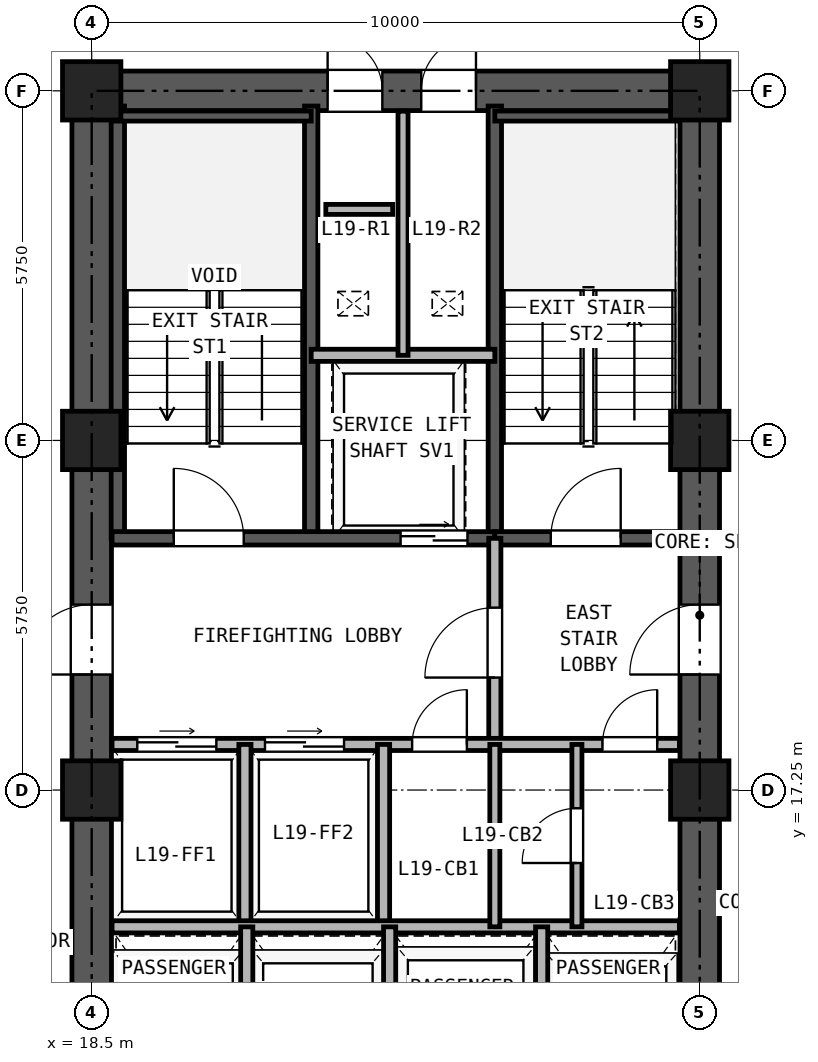
"""IFC4 building model, lengths in metres.
Left out: names, types, materials, properties, quantities, classifications, styles, units other than length and angle.
Written with IfcOpenShell. Run it as: python <this file> out.ifc"""

import sys

from ifc_helpers import new_model, si_unit, direction, frame, frame_2d, origin, origin_2d, place, context, subcontext, project, spatial, rectangle, hollow_rectangle, extrude, source, transform, mapped, element, fill, save


model = new_model("IFC4")
c1 = context("Model", 3, precision=1e-05, world=origin(), true_north=direction((0.0, 1.0)))
c2 = subcontext(c1, "Body", "Model", "MODEL_VIEW")
j1 = project(units=[si_unit("LENGTHUNIT", "METRE"), si_unit("PLANEANGLEUNIT", "RADIAN")], contexts=[c1])
p1 = place(None, origin())
s1 = spatial("IfcSite", under=j1, at=p1, CompositionType="ELEMENT")
p2 = place(p1, origin())
s2 = spatial("IfcBuilding", under=s1, at=p2, CompositionType="ELEMENT")
p3 = place(p2, frame((0.0, 0.0, 72.9)))
s3 = spatial("IfcBuildingStorey", under=s2, at=p3, CompositionType="ELEMENT", Elevation=72.9)
m1 = source(origin(), c2, "Body", "SweptSolid", [
    extrude(hollow_rectangle(XDim=0.96, YDim=0.96, WallThickness=0.06, at=origin_2d()), origin(), (0.0, 0.0, 1.0), 3.24),
])
for number, where, z_axis, x_axis in (
    (1, (18.5, 17.25, 0.0), (0.0, 0.0, 1.0), (1.0, 0.0, 0.0)),
    (2, (18.5, 23.0, 0.0), (0.0, 0.0, 1.0), (1.0, 0.0, 0.0)),
    (3, (18.5, 28.75, 0.0), (0.0, 0.0, 1.0), (1.0, 0.0, 0.0)),
    (4, (28.5, 17.25, 0.0), (0.0, 0.0, 1.0), (1.0, 0.0, 0.0)),
    (5, (28.5, 23.0, 0.0), (0.0, 0.0, 1.0), (1.0, 0.0, 0.0)),
    (6, (28.5, 28.75, 0.0), (0.0, 0.0, 1.0), (1.0, 0.0, 0.0)),
):
    element("IfcColumn", number, at=place(p3, frame(where, z_axis=z_axis, x_axis=x_axis)), inside=s3, PredefinedType="COLUMN", context=c2, shape_type="MappedRepresentation", body=[
        mapped(m1, transform((0.0, 0.0, 0.0), x_axis=(1.0, 0.0, 0.0), y_axis=(0.0, 1.0, 0.0), z_axis=(0.0, 0.0, 1.0), scale=1.0)),
    ])
p4 = place(p3, frame((18.175, 28.75, 0.0), z_axis=(0.0, 0.0, 1.0), x_axis=(1.0, 0.0, 0.0)))
e7 = element("IfcWall", 7, at=p4, inside=s3, PredefinedType="SHEAR", context=c2, shape_type="SweptSolid", body=[
    extrude(rectangle(XDim=10.65, YDim=0.65, at=frame_2d((5.325, 0.0))), origin(), (0.0, 0.0, 1.0), 3.24),
])
p5 = place(p4, frame((4.205, 0.0, 0.0)))
e8 = element("IfcOpeningElement", 8, at=p5, cuts=e7, PredefinedType="OPENING", context=c2, shape_type="SweptSolid", body=[
    extrude(rectangle(XDim=0.9, YDim=2.05, at=frame_2d((0.45, 1.025))), frame((0.0, 0.335, 0.0), z_axis=(0.0, -1.0, 0.0), x_axis=(1.0, 0.0, 0.0)), (0.0, 0.0, 1.0), 0.67),
])
p6 = place(p4, frame((5.745, 0.0, 0.0)))
e9 = element("IfcOpeningElement", 9, at=p6, cuts=e7, PredefinedType="OPENING", context=c2, shape_type="SweptSolid", body=[
    extrude(rectangle(XDim=0.9, YDim=2.05, at=frame_2d((0.45, 1.025))), frame((0.0, 0.335, 0.0), z_axis=(0.0, -1.0, 0.0), x_axis=(1.0, 0.0, 0.0)), (0.0, 0.0, 1.0), 0.67),
])
p7 = place(p3, frame((18.5, 11.825, 0.0), z_axis=(0.0, 0.0, 1.0), x_axis=(0.0, 1.0, 0.0)))
e10 = element("IfcWall", 10, at=p7, inside=s3, PredefinedType="SHEAR", context=c2, shape_type="SweptSolid", body=[
    extrude(rectangle(XDim=16.6, YDim=0.65, at=frame_2d((8.3, 0.0))), origin(), (0.0, 0.0, 1.0), 3.24),
])
p8 = place(p7, frame((7.325, 0.0, 0.0)))
e11 = element("IfcOpeningElement", 11, at=p8, cuts=e10, PredefinedType="OPENING", context=c2, shape_type="SweptSolid", body=[
    extrude(rectangle(XDim=1.15, YDim=2.2, at=frame_2d((0.575, 1.1))), frame((0.0, 0.335, 0.0), z_axis=(0.0, -1.0, 0.0), x_axis=(1.0, 0.0, 0.0)), (0.0, 0.0, 1.0), 0.67),
])
p9 = place(p3, frame((28.5, 11.825, 0.0), z_axis=(0.0, 0.0, 1.0), x_axis=(0.0, 1.0, 0.0)))
e12 = element("IfcWall", 12, at=p9, inside=s3, PredefinedType="SHEAR", context=c2, shape_type="SweptSolid", body=[
    extrude(rectangle(XDim=16.6, YDim=0.65, at=frame_2d((8.3, 0.0))), origin(), (0.0, 0.0, 1.0), 3.24),
])
p10 = place(p9, frame((7.325, 0.0, 0.0)))
e13 = element("IfcOpeningElement", 13, at=p10, cuts=e12, PredefinedType="OPENING", context=c2, shape_type="SweptSolid", body=[
    extrude(rectangle(XDim=1.15, YDim=2.2, at=frame_2d((0.575, 1.1))), frame((0.0, 0.335, 0.0), z_axis=(0.0, -1.0, 0.0), x_axis=(1.0, 0.0, 0.0)), (0.0, 0.0, 1.0), 0.67),
])
for number, where, z_axis, x_axis in (
    (14, (18.93, 21.39, 0.0), (0.0, 0.0, 1.0), (0.0, 1.0, 0.0)),
    (15, (22.11, 21.39, 0.0), (0.0, 0.0, 1.0), (0.0, 1.0, 0.0)),
    (16, (25.13, 21.39, 0.0), (0.0, 0.0, 1.0), (0.0, 1.0, 0.0)),
):
    element("IfcWall", number, at=place(p3, frame(where, z_axis=z_axis, x_axis=x_axis)), inside=s3, PredefinedType="SOLIDWALL", context=c2, shape_type="SweptSolid", body=[
        extrude(rectangle(XDim=7.11, YDim=0.22, at=frame_2d((3.555, 0.0))), origin(), (0.0, 0.0, 1.0), 3.24),
    ])
p11 = place(p3, frame((18.835, 28.335, 0.0), z_axis=(0.0, 0.0, 1.0), x_axis=(1.0, 0.0, 0.0)))
e17 = element("IfcWall", 17, at=p11, inside=s3, PredefinedType="PARTITIONING", context=c2, shape_type="SweptSolid", body=[
    extrude(rectangle(XDim=3.275, YDim=0.165, at=frame_2d((1.638, 0.0))), origin(), (0.0, 0.0, 1.0), 3.24),
])
p12 = place(p3, frame((25.13, 28.335, 0.0), z_axis=(0.0, 0.0, 1.0), x_axis=(1.0, 0.0, 0.0)))
e18 = element("IfcWall", 18, at=p12, inside=s3, PredefinedType="PARTITIONING", context=c2, shape_type="SweptSolid", body=[
    extrude(rectangle(XDim=3.035, YDim=0.165, at=frame_2d((1.518, 0.0))), origin(), (0.0, 0.0, 1.0), 3.24),
])
p13 = place(p3, frame((18.835, 21.39, 0.0), z_axis=(0.0, 0.0, 1.0), x_axis=(1.0, 0.0, 0.0)))
e19 = element("IfcWall", 19, at=p13, inside=s3, PredefinedType="SOLIDWALL", context=c2, shape_type="SweptSolid", body=[
    extrude(rectangle(XDim=6.295, YDim=0.22, at=frame_2d((3.147, 0.0))), origin(), (0.0, 0.0, 1.0), 3.24),
])
p14 = place(p13, frame((1.015, 0.0, 0.0)))
e20 = element("IfcOpeningElement", 20, at=p14, cuts=e19, PredefinedType="OPENING", context=c2, shape_type="SweptSolid", body=[
    extrude(rectangle(XDim=1.15, YDim=2.2, at=frame_2d((0.575, 1.1))), frame((0.0, 0.12, 0.0), z_axis=(0.0, -1.0, 0.0), x_axis=(1.0, 0.0, 0.0)), (0.0, 0.0, 1.0), 0.24),
])
p15 = place(p13, frame((4.745, 0.0, 0.0)))
e21 = element("IfcOpeningElement", 21, at=p15, cuts=e19, PredefinedType="OPENING", context=c2, shape_type="SweptSolid", body=[
    extrude(rectangle(XDim=1.1, YDim=2.25, at=frame_2d((0.55, 1.125))), frame((0.0, 0.12, 0.0), z_axis=(0.0, -1.0, 0.0), x_axis=(1.0, 0.0, 0.0)), (0.0, 0.0, 1.0), 0.24),
])
p16 = place(p3, frame((25.13, 21.39, 0.0), z_axis=(0.0, 0.0, 1.0), x_axis=(1.0, 0.0, 0.0)))
e22 = element("IfcWall", 22, at=p16, inside=s3, PredefinedType="SOLIDWALL", context=c2, shape_type="SweptSolid", body=[
    extrude(rectangle(XDim=3.035, YDim=0.22, at=frame_2d((1.518, 0.0))), origin(), (0.0, 0.0, 1.0), 3.24),
])
p17 = place(p16, frame((0.92, 0.0, 0.0)))
e23 = element("IfcOpeningElement", 23, at=p17, cuts=e22, PredefinedType="OPENING", context=c2, shape_type="SweptSolid", body=[
    extrude(rectangle(XDim=1.15, YDim=2.2, at=frame_2d((0.575, 1.1))), frame((0.0, 0.12, 0.0), z_axis=(0.0, -1.0, 0.0), x_axis=(1.0, 0.0, 0.0)), (0.0, 0.0, 1.0), 0.24),
])
p18 = place(p3, frame((22.11, 24.4, 0.0), z_axis=(0.0, 0.0, 1.0), x_axis=(1.0, 0.0, 0.0)))
e24 = element("IfcWall", 24, at=p18, inside=s3, PredefinedType="PARTITIONING", context=c2, shape_type="SweptSolid", body=[
    extrude(rectangle(XDim=3.02, YDim=0.2, at=frame_2d((1.51, 0.0))), origin(), (0.0, 0.0, 1.0), 3.24),
])
p19 = place(p3, frame((23.62, 24.4, 0.0), z_axis=(0.0, 0.0, 1.0), x_axis=(0.0, 1.0, 0.0)))
e25 = element("IfcWall", 25, at=p19, inside=s3, PredefinedType="PARTITIONING", context=c2, shape_type="SweptSolid", body=[
    extrude(rectangle(XDim=4.015, YDim=0.165, at=frame_2d((2.008, 0.0))), origin(), (0.0, 0.0, 1.0), 3.24),
])
p20 = place(p3, frame((25.13, 18.0, 0.0), z_axis=(0.0, 0.0, 1.0), x_axis=(0.0, 1.0, 0.0)))
e26 = element("IfcWall", 26, at=p20, inside=s3, PredefinedType="PARTITIONING", context=c2, shape_type="SweptSolid", body=[
    extrude(rectangle(XDim=3.39, YDim=0.2, at=frame_2d((1.695, 0.0))), origin(), (0.0, 0.0, 1.0), 3.24),
])
p21 = place(p20, frame((1.1, 0.0, 0.0)))
e27 = element("IfcOpeningElement", 27, at=p21, cuts=e26, PredefinedType="OPENING", context=c2, shape_type="SweptSolid", body=[
    extrude(rectangle(XDim=1.15, YDim=2.2, at=frame_2d((0.575, 1.1))), frame((0.0, 0.11, 0.0), z_axis=(0.0, -1.0, 0.0), x_axis=(1.0, 0.0, 0.0)), (0.0, 0.0, 1.0), 0.22),
])
p22 = place(p3, frame((18.835, 18.0, 0.0), z_axis=(0.0, 0.0, 1.0), x_axis=(1.0, 0.0, 0.0)))
e28 = element("IfcWall", 28, at=p22, inside=s3, PredefinedType="PARTITIONING", context=c2, shape_type="SweptSolid", body=[
    extrude(rectangle(XDim=9.33, YDim=0.2, at=frame_2d((4.665, 0.0))), origin(), (0.0, 0.0, 1.0), 3.24),
])
p23 = place(p22, frame((0.415, 0.0, 0.0)))
e29 = element("IfcOpeningElement", 29, at=p23, cuts=e28, PredefinedType="OPENING", context=c2, shape_type="SweptSolid", body=[
    extrude(rectangle(XDim=1.3, YDim=2.3, at=frame_2d((0.65, 1.15))), frame((0.0, 0.11, 0.0), z_axis=(0.0, -1.0, 0.0), x_axis=(1.0, 0.0, 0.0)), (0.0, 0.0, 1.0), 0.22),
])
p24 = place(p22, frame((2.515, 0.0, 0.0)))
e30 = element("IfcOpeningElement", 30, at=p24, cuts=e28, PredefinedType="OPENING", context=c2, shape_type="SweptSolid", body=[
    extrude(rectangle(XDim=1.3, YDim=2.3, at=frame_2d((0.65, 1.15))), frame((0.0, 0.11, 0.0), z_axis=(0.0, -1.0, 0.0), x_axis=(1.0, 0.0, 0.0)), (0.0, 0.0, 1.0), 0.22),
])
p25 = place(p22, frame((4.935, 0.0, 0.0)))
e31 = element("IfcOpeningElement", 31, at=p25, cuts=e28, PredefinedType="OPENING", context=c2, shape_type="SweptSolid", body=[
    extrude(rectangle(XDim=0.9, YDim=2.05, at=frame_2d((0.45, 1.025))), frame((0.0, 0.11, 0.0), z_axis=(0.0, -1.0, 0.0), x_axis=(1.0, 0.0, 0.0)), (0.0, 0.0, 1.0), 0.22),
])
p26 = place(p22, frame((8.065, 0.0, 0.0)))
e32 = element("IfcOpeningElement", 32, at=p26, cuts=e28, PredefinedType="OPENING", context=c2, shape_type="SweptSolid", body=[
    extrude(rectangle(XDim=0.9, YDim=2.05, at=frame_2d((0.45, 1.025))), frame((0.0, 0.11, 0.0), z_axis=(0.0, -1.0, 0.0), x_axis=(1.0, 0.0, 0.0)), (0.0, 0.0, 1.0), 0.22),
])
for number, where, z_axis, x_axis in (
    (33, (21.02, 15.0, 0.0), (0.0, 0.0, 1.0), (0.0, 1.0, 0.0)),
    (34, (23.3, 15.0, 0.0), (0.0, 0.0, 1.0), (0.0, 1.0, 0.0)),
):
    element("IfcWall", number, at=place(p3, frame(where, z_axis=z_axis, x_axis=x_axis)), inside=s3, PredefinedType="PARTITIONING", context=c2, shape_type="SweptSolid", body=[
        extrude(rectangle(XDim=3.0, YDim=0.2, at=frame_2d((1.5, 0.0))), origin(), (0.0, 0.0, 1.0), 3.24),
    ])
p27 = place(p3, frame((18.835, 15.0, 0.0), z_axis=(0.0, 0.0, 1.0), x_axis=(1.0, 0.0, 0.0)))
e35 = element("IfcWall", 35, at=p27, inside=s3, PredefinedType="PARTITIONING", context=c2, shape_type="SweptSolid", body=[
    extrude(rectangle(XDim=9.33, YDim=0.2, at=frame_2d((4.665, 0.0))), origin(), (0.0, 0.0, 1.0), 3.24),
])
p28 = place(p3, frame((25.13, 15.0, 0.0), z_axis=(0.0, 0.0, 1.0), x_axis=(0.0, 1.0, 0.0)))
e36 = element("IfcWall", 36, at=p28, inside=s3, PredefinedType="PARTITIONING", context=c2, shape_type="SweptSolid", body=[
    extrude(rectangle(XDim=3.0, YDim=0.165, at=frame_2d((1.5, 0.0))), origin(), (0.0, 0.0, 1.0), 3.24),
])
p29 = place(p3, frame((26.48, 15.0, 0.0), z_axis=(0.0, 0.0, 1.0), x_axis=(0.0, 1.0, 0.0)))
e37 = element("IfcWall", 37, at=p29, inside=s3, PredefinedType="PARTITIONING", context=c2, shape_type="SweptSolid", body=[
    extrude(rectangle(XDim=3.0, YDim=0.165, at=frame_2d((1.5, 0.0))), origin(), (0.0, 0.0, 1.0), 3.24),
])
p30 = place(p29, frame((1.05, 0.0, 0.0)))
e38 = element("IfcOpeningElement", 38, at=p30, cuts=e37, PredefinedType="OPENING", context=c2, shape_type="SweptSolid", body=[
    extrude(rectangle(XDim=0.9, YDim=2.05, at=frame_2d((0.45, 1.025))), frame((0.0, 0.093, 0.0), z_axis=(0.0, -1.0, 0.0), x_axis=(1.0, 0.0, 0.0)), (0.0, 0.0, 1.0), 0.185),
])
for number, where, z_axis, x_axis in (
    (39, (21.05, 11.835, 0.0), (0.0, 0.0, 1.0), (0.0, 1.0, 0.0)),
    (40, (23.4, 11.835, 0.0), (0.0, 0.0, 1.0), (0.0, 1.0, 0.0)),
    (41, (25.9, 11.835, 0.0), (0.0, 0.0, 1.0), (0.0, 1.0, 0.0)),
):
    element("IfcWall", number, at=place(p3, frame(where, z_axis=z_axis, x_axis=x_axis)), inside=s3, PredefinedType="PARTITIONING", context=c2, shape_type="SweptSolid", body=[
        extrude(rectangle(XDim=3.165, YDim=0.2, at=frame_2d((1.583, 0.0))), origin(), (0.0, 0.0, 1.0), 3.24),
    ])
p31 = place(p3, frame((22.35, 26.8, 0.0), z_axis=(0.0, 0.0, 1.0), x_axis=(1.0, 0.0, 0.0)))
e42 = element("IfcWall", 42, at=p31, inside=s3, PredefinedType="PARTITIONING", context=c2, shape_type="SweptSolid", body=[
    extrude(rectangle(XDim=1.1, YDim=0.165, at=frame_2d((0.55, 0.0))), origin(), (0.0, 0.0, 1.0), 3.24),
])
p32 = place(p14, frame((1.15, 0.0, 0.0), z_axis=(0.0, 0.0, 1.0), x_axis=(-1.0, 0.0, 0.0)))
e43 = element("IfcDoor", 43, at=p32, inside=s3, OperationType="SINGLE_SWING_LEFT", PredefinedType="DOOR", context=c2, shape_type="SweptSolid", body=[
    extrude(rectangle(XDim=1.15, YDim=2.2, at=frame_2d((0.575, 1.1))), frame((0.0, 0.025, 0.0), z_axis=(0.0, -1.0, 0.0), x_axis=(1.0, 0.0, 0.0)), (0.0, 0.0, 1.0), 0.05),
])
fill(e20, e43)
p33 = place(p17, frame((1.15, 0.0, 0.0), z_axis=(0.0, 0.0, 1.0), x_axis=(-1.0, 0.0, 0.0)))
e44 = element("IfcDoor", 44, at=p33, inside=s3, OperationType="SINGLE_SWING_RIGHT", PredefinedType="DOOR", context=c2, shape_type="SweptSolid", body=[
    extrude(rectangle(XDim=1.15, YDim=2.2, at=frame_2d((0.575, 1.1))), frame((0.0, 0.025, 0.0), z_axis=(0.0, -1.0, 0.0), x_axis=(1.0, 0.0, 0.0)), (0.0, 0.0, 1.0), 0.05),
])
fill(e23, e44)
p34 = place(p15, frame((1.1, 0.0, 0.0), z_axis=(0.0, 0.0, 1.0), x_axis=(-1.0, 0.0, 0.0)))
e45 = element("IfcDoor", 45, at=p34, inside=s3, OperationType="DOUBLE_DOOR_SLIDING", PredefinedType="DOOR", context=c2, shape_type="SweptSolid", body=[
    extrude(rectangle(XDim=1.1, YDim=2.25, at=frame_2d((0.55, 1.125))), frame((0.0, 0.025, 0.0), z_axis=(0.0, -1.0, 0.0), x_axis=(1.0, 0.0, 0.0)), (0.0, 0.0, 1.0), 0.05),
])
fill(e21, e45)
p35 = place(p21, origin())
e46 = element("IfcDoor", 46, at=p35, inside=s3, OperationType="SINGLE_SWING_LEFT", PredefinedType="DOOR", context=c2, shape_type="SweptSolid", body=[
    extrude(rectangle(XDim=1.15, YDim=2.2, at=frame_2d((0.575, 1.1))), frame((0.0, 0.025, 0.0), z_axis=(0.0, -1.0, 0.0), x_axis=(1.0, 0.0, 0.0)), (0.0, 0.0, 1.0), 0.05),
])
fill(e27, e46)
p36 = place(p23, origin())
e47 = element("IfcDoor", 47, at=p36, inside=s3, OperationType="DOUBLE_DOOR_SLIDING", PredefinedType="DOOR", context=c2, shape_type="SweptSolid", body=[
    extrude(rectangle(XDim=1.3, YDim=2.3, at=frame_2d((0.65, 1.15))), frame((0.0, 0.025, 0.0), z_axis=(0.0, -1.0, 0.0), x_axis=(1.0, 0.0, 0.0)), (0.0, 0.0, 1.0), 0.05),
])
fill(e29, e47)
p37 = place(p24, origin())
e48 = element("IfcDoor", 48, at=p37, inside=s3, OperationType="DOUBLE_DOOR_SLIDING", PredefinedType="DOOR", context=c2, shape_type="SweptSolid", body=[
    extrude(rectangle(XDim=1.3, YDim=2.3, at=frame_2d((0.65, 1.15))), frame((0.0, 0.025, 0.0), z_axis=(0.0, -1.0, 0.0), x_axis=(1.0, 0.0, 0.0)), (0.0, 0.0, 1.0), 0.05),
])
fill(e30, e48)
p38 = place(p25, frame((0.9, 0.0, 0.0), z_axis=(0.0, 0.0, 1.0), x_axis=(-1.0, 0.0, 0.0)))
e49 = element("IfcDoor", 49, at=p38, inside=s3, OperationType="SINGLE_SWING_RIGHT", PredefinedType="DOOR", context=c2, shape_type="SweptSolid", body=[
    extrude(rectangle(XDim=0.9, YDim=2.05, at=frame_2d((0.45, 1.025))), frame((0.0, 0.025, 0.0), z_axis=(0.0, -1.0, 0.0), x_axis=(1.0, 0.0, 0.0)), (0.0, 0.0, 1.0), 0.05),
])
fill(e31, e49)
p39 = place(p30, origin())
e50 = element("IfcDoor", 50, at=p39, inside=s3, OperationType="SINGLE_SWING_LEFT", PredefinedType="DOOR", context=c2, shape_type="SweptSolid", body=[
    extrude(rectangle(XDim=0.9, YDim=2.05, at=frame_2d((0.45, 1.025))), frame((0.0, 0.025, 0.0), z_axis=(0.0, -1.0, 0.0), x_axis=(1.0, 0.0, 0.0)), (0.0, 0.0, 1.0), 0.05),
])
fill(e38, e50)
p40 = place(p26, frame((0.9, 0.0, 0.0), z_axis=(0.0, 0.0, 1.0), x_axis=(-1.0, 0.0, 0.0)))
e51 = element("IfcDoor", 51, at=p40, inside=s3, OperationType="SINGLE_SWING_RIGHT", PredefinedType="DOOR", context=c2, shape_type="SweptSolid", body=[
    extrude(rectangle(XDim=0.9, YDim=2.05, at=frame_2d((0.45, 1.025))), frame((0.0, 0.025, 0.0), z_axis=(0.0, -1.0, 0.0), x_axis=(1.0, 0.0, 0.0)), (0.0, 0.0, 1.0), 0.05),
])
fill(e32, e51)
p41 = place(p8, frame((1.15, 0.0, 0.0), z_axis=(0.0, 0.0, 1.0), x_axis=(-1.0, 0.0, 0.0)))
e52 = element("IfcDoor", 52, at=p41, inside=s3, OperationType="SINGLE_SWING_LEFT", PredefinedType="DOOR", context=c2, shape_type="SweptSolid", body=[
    extrude(rectangle(XDim=1.15, YDim=2.2, at=frame_2d((0.575, 1.1))), frame((0.0, 0.025, 0.0), z_axis=(0.0, -1.0, 0.0), x_axis=(1.0, 0.0, 0.0)), (0.0, 0.0, 1.0), 0.05),
])
fill(e11, e52)
p42 = place(p10, origin())
e53 = element("IfcDoor", 53, at=p42, inside=s3, OperationType="SINGLE_SWING_LEFT", PredefinedType="DOOR", context=c2, shape_type="SweptSolid", body=[
    extrude(rectangle(XDim=1.15, YDim=2.2, at=frame_2d((0.575, 1.1))), frame((0.0, 0.025, 0.0), z_axis=(0.0, -1.0, 0.0), x_axis=(1.0, 0.0, 0.0)), (0.0, 0.0, 1.0), 0.05),
])
fill(e13, e53)
p43 = place(p5, origin())
e54 = element("IfcDoor", 54, at=p43, inside=s3, OperationType="SINGLE_SWING_LEFT", PredefinedType="DOOR", context=c2, shape_type="SweptSolid", body=[
    extrude(rectangle(XDim=0.9, YDim=2.05, at=frame_2d((0.45, 1.025))), frame((0.0, 0.025, 0.0), z_axis=(0.0, -1.0, 0.0), x_axis=(1.0, 0.0, 0.0)), (0.0, 0.0, 1.0), 0.05),
])
fill(e8, e54)
p44 = place(p6, origin())
e55 = element("IfcDoor", 55, at=p44, inside=s3, OperationType="SINGLE_SWING_RIGHT", PredefinedType="DOOR", context=c2, shape_type="SweptSolid", body=[
    extrude(rectangle(XDim=0.9, YDim=2.05, at=frame_2d((0.45, 1.025))), frame((0.0, 0.025, 0.0), z_axis=(0.0, -1.0, 0.0), x_axis=(1.0, 0.0, 0.0)), (0.0, 0.0, 1.0), 0.05),
])
fill(e9, e55)
save(model, sys.argv[1])
